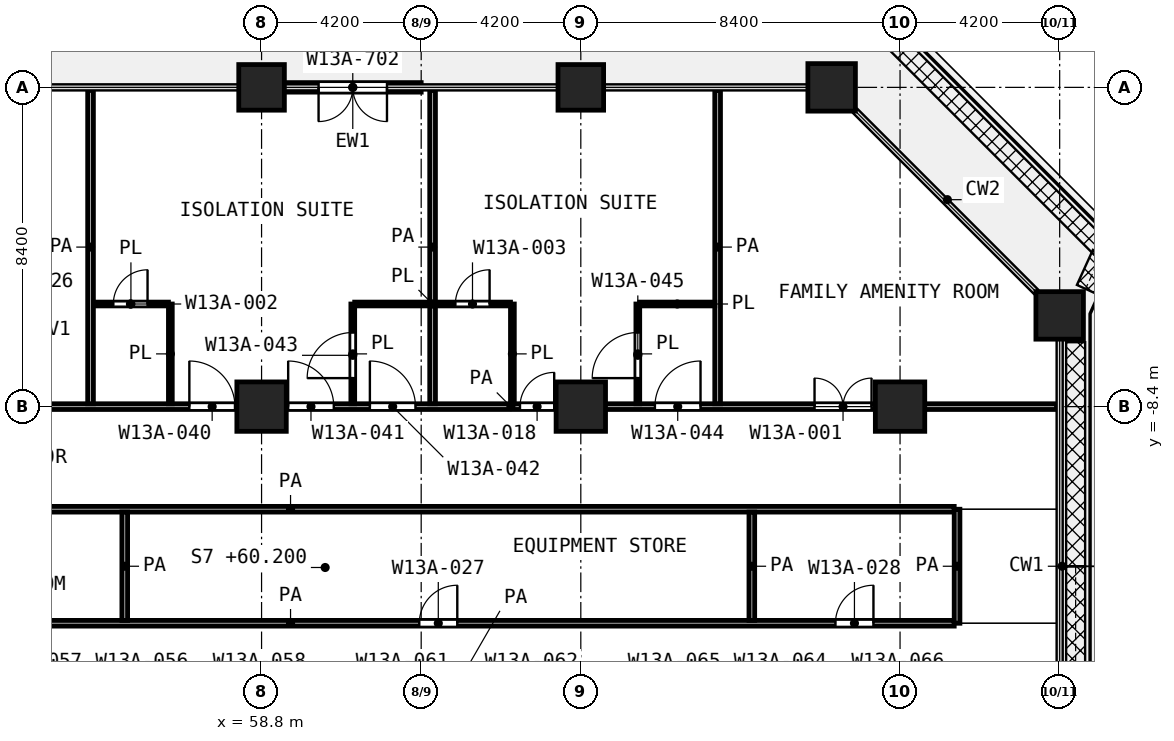
"""IFC4 building model, lengths in metres.
Left out: names, types, materials, properties, quantities, classifications, styles, units other than length and angle.
Written with IfcOpenShell. Run it as: python <this file> out.ifc"""

import sys

from ifc_helpers import new_model, si_unit, direction, frame, frame_2d, origin, origin_2d, place, context, subcontext, project, spatial, rectangle, extrude, element, fill, save


model = new_model("IFC4")
c1 = context("Model", 3, precision=1e-05, world=origin(), true_north=direction((0.0, 1.0)))
c2 = subcontext(c1, "Body", "Model", "MODEL_VIEW")
j1 = project(units=[si_unit("LENGTHUNIT", "METRE"), si_unit("PLANEANGLEUNIT", "RADIAN")], contexts=[c1])
p1 = place(None, origin())
s1 = spatial("IfcSite", under=j1, at=p1, CompositionType="ELEMENT")
p2 = place(p1, origin())
s2 = spatial("IfcBuilding", under=s1, at=p2, CompositionType="ELEMENT")
p3 = place(p2, frame((0.0, 0.0, 60.2)))
s3 = spatial("IfcBuildingStorey", under=s2, at=p3, CompositionType="ELEMENT", Elevation=60.2)
for number, where, z_axis, x_axis in (
    (1, (58.8, 0.0, 0.0), (0.0, 0.0, 1.0), (1.0, 0.0, 0.0)),
    (2, (67.2, 0.0, 0.0), (0.0, 0.0, 1.0), (1.0, 0.0, 0.0)),
):
    element("IfcColumn", number, at=place(p3, frame(where, z_axis=z_axis, x_axis=x_axis)), inside=s3, PredefinedType="COLUMN", context=c2, shape_type="SweptSolid", body=[
        extrude(rectangle(XDim=1.2, YDim=1.2, at=origin_2d()), origin(), (0.0, 0.0, 1.0), 4.2),
    ])
for number, where, z_axis, x_axis in (
    (3, (73.8, 0.0, 0.0), (0.0, 0.0, 1.0), (1.0, 0.0, 0.0)),
    (4, (79.8, -6.0, 0.0), (0.0, 0.0, 1.0), (1.0, 0.0, 0.0)),
):
    element("IfcColumn", number, at=place(p3, frame(where, z_axis=z_axis, x_axis=x_axis)), inside=s3, PredefinedType="COLUMN", context=c2, shape_type="SweptSolid", body=[
        extrude(rectangle(XDim=1.25, YDim=1.25, at=origin_2d()), origin(), (0.0, 0.0, 1.0), 4.2),
    ])
for number, where, z_axis, x_axis in (
    (5, (58.8, -8.4, 0.0), (0.0, 0.0, 1.0), (1.0, 0.0, 0.0)),
    (6, (67.2, -8.4, 0.0), (0.0, 0.0, 1.0), (1.0, 0.0, 0.0)),
    (7, (75.6, -8.4, 0.0), (0.0, 0.0, 1.0), (1.0, 0.0, 0.0)),
):
    element("IfcColumn", number, at=place(p3, frame(where, z_axis=z_axis, x_axis=x_axis)), inside=s3, PredefinedType="COLUMN", context=c2, shape_type="SweptSolid", body=[
        extrude(rectangle(XDim=1.3, YDim=1.3, at=origin_2d()), origin(), (0.0, 0.0, 1.0), 4.2),
    ])
p4 = place(p3, frame((63.0, 0.0, 0.0), z_axis=(0.0, 0.0, 1.0), x_axis=(-1.0, 0.0, 0.0)))
e8 = element("IfcWall", 8, at=p4, inside=s3, PredefinedType="SOLIDWALL", context=c2, shape_type="SweptSolid", body=[
    extrude(rectangle(XDim=3.6, YDim=0.25, at=frame_2d((1.8, 0.0))), origin(), (0.0, 0.0, 1.0), 3.78),
])
p5 = place(p4, frame((0.9, 0.0, 0.0)))
e9 = element("IfcOpeningElement", 9, at=p5, cuts=e8, PredefinedType="OPENING", context=c2, shape_type="SweptSolid", body=[
    extrude(rectangle(XDim=1.8, YDim=2.1, at=frame_2d((0.9, 1.05))), frame((0.0, 0.135, 0.0), z_axis=(0.0, -1.0, 0.0), x_axis=(1.0, 0.0, 0.0)), (0.0, 0.0, 1.0), 0.27),
])
p6 = place(p3, frame((54.375, -5.7, 0.0), z_axis=(0.0, 0.0, 1.0), x_axis=(1.0, 0.0, 0.0)))
e10 = element("IfcWall", 10, at=p6, inside=s3, PredefinedType="PARTITIONING", context=c2, shape_type="SweptSolid", body=[
    extrude(rectangle(XDim=1.975, YDim=0.1, at=frame_2d((0.988, 0.0))), origin(), (0.0, 0.0, 1.0), 3.9),
])
p7 = place(p6, frame((0.525, 0.0, 0.0)))
e11 = element("IfcOpeningElement", 11, at=p7, cuts=e10, PredefinedType="OPENING", context=c2, shape_type="SweptSolid", body=[
    extrude(rectangle(XDim=0.9, YDim=2.1, at=frame_2d((0.45, 1.05))), frame((0.0, 0.06, 0.0), z_axis=(0.0, -1.0, 0.0), x_axis=(1.0, 0.0, 0.0)), (0.0, 0.0, 1.0), 0.12),
])
p8 = place(p3, frame((61.25, -5.7, 0.0), z_axis=(0.0, 0.0, 1.0), x_axis=(1.0, 0.0, 0.0)))
e12 = element("IfcWall", 12, at=p8, inside=s3, PredefinedType="PARTITIONING", context=c2, shape_type="SweptSolid", body=[
    extrude(rectangle(XDim=4.1, YDim=0.1, at=frame_2d((2.05, 0.0))), origin(), (0.0, 0.0, 1.0), 3.9),
])
p9 = place(p8, frame((2.65, 0.0, 0.0)))
e13 = element("IfcOpeningElement", 13, at=p9, cuts=e12, PredefinedType="OPENING", context=c2, shape_type="SweptSolid", body=[
    extrude(rectangle(XDim=0.9, YDim=2.1, at=frame_2d((0.45, 1.05))), frame((0.0, 0.06, 0.0), z_axis=(0.0, -1.0, 0.0), x_axis=(1.0, 0.0, 0.0)), (0.0, 0.0, 1.0), 0.12),
])
p10 = place(p3, frame((68.75, -5.7, 0.0), z_axis=(0.0, 0.0, 1.0), x_axis=(1.0, 0.0, 0.0)))
e14 = element("IfcWall", 14, at=p10, inside=s3, PredefinedType="PARTITIONING", context=c2, shape_type="SweptSolid", body=[
    extrude(rectangle(XDim=1.975, YDim=0.1, at=frame_2d((0.988, 0.0))), origin(), (0.0, 0.0, 1.0), 3.9),
])
p11 = place(p3, frame((56.4, -8.325, 0.0), z_axis=(0.0, 0.0, 1.0), x_axis=(0.0, 1.0, 0.0)))
e15 = element("IfcWall", 15, at=p11, inside=s3, PredefinedType="PARTITIONING", context=c2, shape_type="SweptSolid", body=[
    extrude(rectangle(XDim=2.625, YDim=0.1, at=frame_2d((1.312, 0.0))), origin(), (0.0, 0.0, 1.0), 3.9),
])
p12 = place(p3, frame((61.2, -8.325, 0.0), z_axis=(0.0, 0.0, 1.0), x_axis=(0.0, 1.0, 0.0)))
e16 = element("IfcWall", 16, at=p12, inside=s3, PredefinedType="PARTITIONING", context=c2, shape_type="SweptSolid", body=[
    extrude(rectangle(XDim=2.625, YDim=0.1, at=frame_2d((1.312, 0.0))), origin(), (0.0, 0.0, 1.0), 3.9),
])
p13 = place(p12, frame((0.675, 0.0, 0.0)))
e17 = element("IfcOpeningElement", 17, at=p13, cuts=e16, PredefinedType="OPENING", context=c2, shape_type="SweptSolid", body=[
    extrude(rectangle(XDim=1.2, YDim=2.1, at=frame_2d((0.6, 1.05))), frame((0.0, 0.06, 0.0), z_axis=(0.0, -1.0, 0.0), x_axis=(1.0, 0.0, 0.0)), (0.0, 0.0, 1.0), 0.12),
])
p14 = place(p3, frame((65.4, -8.325, 0.0), z_axis=(0.0, 0.0, 1.0), x_axis=(0.0, 1.0, 0.0)))
e18 = element("IfcWall", 18, at=p14, inside=s3, PredefinedType="PARTITIONING", context=c2, shape_type="SweptSolid", body=[
    extrude(rectangle(XDim=2.625, YDim=0.1, at=frame_2d((1.312, 0.0))), origin(), (0.0, 0.0, 1.0), 3.9),
])
p15 = place(p3, frame((68.7, -8.325, 0.0), z_axis=(0.0, 0.0, 1.0), x_axis=(0.0, 1.0, 0.0)))
e19 = element("IfcWall", 19, at=p15, inside=s3, PredefinedType="PARTITIONING", context=c2, shape_type="SweptSolid", body=[
    extrude(rectangle(XDim=2.625, YDim=0.1, at=frame_2d((1.312, 0.0))), origin(), (0.0, 0.0, 1.0), 3.9),
])
p16 = place(p15, frame((0.675, 0.0, 0.0)))
e20 = element("IfcOpeningElement", 20, at=p16, cuts=e19, PredefinedType="OPENING", context=c2, shape_type="SweptSolid", body=[
    extrude(rectangle(XDim=1.2, YDim=2.1, at=frame_2d((0.6, 1.05))), frame((0.0, 0.06, 0.0), z_axis=(0.0, -1.0, 0.0), x_axis=(1.0, 0.0, 0.0)), (0.0, 0.0, 1.0), 0.12),
])
p17 = place(p3, frame((42.1, -14.1, 0.0), z_axis=(0.0, 0.0, 1.0), x_axis=(1.0, 0.0, 0.0)))
e21 = element("IfcWall", 21, at=p17, inside=s3, PredefinedType="PARTITIONING", context=c2, shape_type="SweptSolid", body=[
    extrude(rectangle(XDim=34.925, YDim=0.15, at=frame_2d((17.462, 0.0))), origin(), (0.0, 0.0, 1.0), 3.9),
])
p18 = place(p17, frame((20.85, 0.0, 0.0)))
e22 = element("IfcOpeningElement", 22, at=p18, cuts=e21, PredefinedType="OPENING", context=c2, shape_type="SweptSolid", body=[
    extrude(rectangle(XDim=1.0, YDim=2.1, at=frame_2d((0.5, 1.05))), frame((0.0, 0.085, 0.0), z_axis=(0.0, -1.0, 0.0), x_axis=(1.0, 0.0, 0.0)), (0.0, 0.0, 1.0), 0.17),
])
p19 = place(p17, frame((31.8, 0.0, 0.0)))
e23 = element("IfcOpeningElement", 23, at=p19, cuts=e21, PredefinedType="OPENING", context=c2, shape_type="SweptSolid", body=[
    extrude(rectangle(XDim=1.0, YDim=2.1, at=frame_2d((0.5, 1.05))), frame((0.0, 0.085, 0.0), z_axis=(0.0, -1.0, 0.0), x_axis=(1.0, 0.0, 0.0)), (0.0, 0.0, 1.0), 0.17),
])
p20 = place(p3, frame((42.1, -11.1, 0.0), z_axis=(0.0, 0.0, 1.0), x_axis=(1.0, 0.0, 0.0)))
e24 = element("IfcWall", 24, at=p20, inside=s3, PredefinedType="PARTITIONING", context=c2, shape_type="SweptSolid", body=[
    extrude(rectangle(XDim=34.925, YDim=0.15, at=frame_2d((17.462, 0.0))), origin(), (0.0, 0.0, 1.0), 3.9),
])
p21 = place(p20, frame((5.9, 0.0, 0.0)))
e25 = element("IfcOpeningElement", 25, at=p21, cuts=e24, PredefinedType="OPENING", context=c2, shape_type="SweptSolid", body=[
    extrude(rectangle(XDim=1.2, YDim=2.1, at=frame_2d((0.6, 1.05))), frame((0.0, 0.085, 0.0), z_axis=(0.0, -1.0, 0.0), x_axis=(1.0, 0.0, 0.0)), (0.0, 0.0, 1.0), 0.17),
])
p22 = place(p3, frame((51.0, -8.4, 0.0), z_axis=(0.0, 0.0, 1.0), x_axis=(1.0, 0.0, 0.0)))
e26 = element("IfcWall", 26, at=p22, inside=s3, PredefinedType="PARTITIONING", context=c2, shape_type="SweptSolid", body=[
    extrude(rectangle(XDim=28.72, YDim=0.15, at=frame_2d((14.36, 0.0))), origin(), (0.0, 0.0, 1.0), 3.9),
])
p23 = place(p22, frame((5.9, 0.0, 0.0)))
e27 = element("IfcOpeningElement", 27, at=p23, cuts=e26, PredefinedType="OPENING", context=c2, shape_type="SweptSolid", body=[
    extrude(rectangle(XDim=1.2, YDim=2.1, at=frame_2d((0.6, 1.05))), frame((0.0, 0.085, 0.0), z_axis=(0.0, -1.0, 0.0), x_axis=(1.0, 0.0, 0.0)), (0.0, 0.0, 1.0), 0.17),
])
p24 = place(p22, frame((8.5, 0.0, 0.0)))
e28 = element("IfcOpeningElement", 28, at=p24, cuts=e26, PredefinedType="OPENING", context=c2, shape_type="SweptSolid", body=[
    extrude(rectangle(XDim=1.2, YDim=2.1, at=frame_2d((0.6, 1.05))), frame((0.0, 0.085, 0.0), z_axis=(0.0, -1.0, 0.0), x_axis=(1.0, 0.0, 0.0)), (0.0, 0.0, 1.0), 0.17),
])
p25 = place(p22, frame((10.65, 0.0, 0.0)))
e29 = element("IfcOpeningElement", 29, at=p25, cuts=e26, PredefinedType="OPENING", context=c2, shape_type="SweptSolid", body=[
    extrude(rectangle(XDim=1.2, YDim=2.1, at=frame_2d((0.6, 1.05))), frame((0.0, 0.085, 0.0), z_axis=(0.0, -1.0, 0.0), x_axis=(1.0, 0.0, 0.0)), (0.0, 0.0, 1.0), 0.17),
])
p26 = place(p22, frame((14.6, 0.0, 0.0)))
e30 = element("IfcOpeningElement", 30, at=p26, cuts=e26, PredefinedType="OPENING", context=c2, shape_type="SweptSolid", body=[
    extrude(rectangle(XDim=0.9, YDim=2.1, at=frame_2d((0.45, 1.05))), frame((0.0, 0.085, 0.0), z_axis=(0.0, -1.0, 0.0), x_axis=(1.0, 0.0, 0.0)), (0.0, 0.0, 1.0), 0.17),
])
p27 = place(p22, frame((18.15, 0.0, 0.0)))
e31 = element("IfcOpeningElement", 31, at=p27, cuts=e26, PredefinedType="OPENING", context=c2, shape_type="SweptSolid", body=[
    extrude(rectangle(XDim=1.2, YDim=2.1, at=frame_2d((0.6, 1.05))), frame((0.0, 0.085, 0.0), z_axis=(0.0, -1.0, 0.0), x_axis=(1.0, 0.0, 0.0)), (0.0, 0.0, 1.0), 0.17),
])
p28 = place(p22, frame((22.35, 0.0, 0.0)))
e32 = element("IfcOpeningElement", 32, at=p28, cuts=e26, PredefinedType="OPENING", context=c2, shape_type="SweptSolid", body=[
    extrude(rectangle(XDim=1.5, YDim=2.1, at=frame_2d((0.75, 1.05))), frame((0.0, 0.085, 0.0), z_axis=(0.0, -1.0, 0.0), x_axis=(1.0, 0.0, 0.0)), (0.0, 0.0, 1.0), 0.17),
])
p29 = place(p3, frame((54.3, -8.325, 0.0), z_axis=(0.0, 0.0, 1.0), x_axis=(0.0, 1.0, 0.0)))
e33 = element("IfcWall", 33, at=p29, inside=s3, PredefinedType="PARTITIONING", context=c2, shape_type="SweptSolid", body=[
    extrude(rectangle(XDim=8.245, YDim=0.15, at=frame_2d((4.123, 0.0))), origin(), (0.0, 0.0, 1.0), 3.9),
])
p30 = place(p3, frame((55.2, -14.025, 0.0), z_axis=(0.0, 0.0, 1.0), x_axis=(0.0, 1.0, 0.0)))
e34 = element("IfcWall", 34, at=p30, inside=s3, PredefinedType="PARTITIONING", context=c2, shape_type="SweptSolid", body=[
    extrude(rectangle(XDim=2.85, YDim=0.15, at=frame_2d((1.425, 0.0))), origin(), (0.0, 0.0, 1.0), 3.9),
])
for number, where, z_axis, x_axis in (
    (35, (63.3, -8.325, 0.0), (0.0, 0.0, 1.0), (0.0, 1.0, 0.0)),
    (36, (70.8, -8.325, 0.0), (0.0, 0.0, 1.0), (0.0, 1.0, 0.0)),
):
    element("IfcWall", number, at=place(p3, frame(where, z_axis=z_axis, x_axis=x_axis)), inside=s3, PredefinedType="PARTITIONING", context=c2, shape_type="SweptSolid", body=[
        extrude(rectangle(XDim=8.245, YDim=0.15, at=frame_2d((4.123, 0.0))), origin(), (0.0, 0.0, 1.0), 3.9),
    ])
p31 = place(p3, frame((71.7, -14.025, 0.0), z_axis=(0.0, 0.0, 1.0), x_axis=(0.0, 1.0, 0.0)))
e37 = element("IfcWall", 37, at=p31, inside=s3, PredefinedType="PARTITIONING", context=c2, shape_type="SweptSolid", body=[
    extrude(rectangle(XDim=2.85, YDim=0.15, at=frame_2d((1.425, 0.0))), origin(), (0.0, 0.0, 1.0), 3.9),
])
p32 = place(p3, frame((77.1, -14.1, 0.0), z_axis=(0.0, 0.0, 1.0), x_axis=(0.0, 1.0, 0.0)))
e38 = element("IfcWall", 38, at=p32, inside=s3, PredefinedType="PARTITIONING", context=c2, shape_type="SweptSolid", body=[
    extrude(rectangle(XDim=3.0, YDim=0.15, at=frame_2d((1.5, 0.0))), origin(), (0.0, 0.0, 1.0), 3.9),
])
p33 = place(p5, origin())
e39 = element("IfcDoor", 39, at=p33, inside=s3, OperationType="DOUBLE_DOOR_SINGLE_SWING", PredefinedType="DOOR", context=c2, shape_type="SweptSolid", body=[
    extrude(rectangle(XDim=1.8, YDim=2.1, at=frame_2d((0.9, 1.05))), frame((0.0, 0.025, 0.0), z_axis=(0.0, -1.0, 0.0), x_axis=(1.0, 0.0, 0.0)), (0.0, 0.0, 1.0), 0.05),
])
fill(e9, e39)
p34 = place(p23, origin())
e40 = element("IfcDoor", 40, at=p34, inside=s3, OperationType="SINGLE_SWING_LEFT", PredefinedType="DOOR", context=c2, shape_type="SweptSolid", body=[
    extrude(rectangle(XDim=1.2, YDim=2.1, at=frame_2d((0.6, 1.05))), frame((0.0, 0.025, 0.0), z_axis=(0.0, -1.0, 0.0), x_axis=(1.0, 0.0, 0.0)), (0.0, 0.0, 1.0), 0.05),
])
fill(e27, e40)
p35 = place(p24, origin())
e41 = element("IfcDoor", 41, at=p35, inside=s3, OperationType="SINGLE_SWING_LEFT", PredefinedType="DOOR", context=c2, shape_type="SweptSolid", body=[
    extrude(rectangle(XDim=1.2, YDim=2.1, at=frame_2d((0.6, 1.05))), frame((0.0, 0.025, 0.0), z_axis=(0.0, -1.0, 0.0), x_axis=(1.0, 0.0, 0.0)), (0.0, 0.0, 1.0), 0.05),
])
fill(e28, e41)
p36 = place(p25, origin())
e42 = element("IfcDoor", 42, at=p36, inside=s3, OperationType="SINGLE_SWING_LEFT", PredefinedType="DOOR", context=c2, shape_type="SweptSolid", body=[
    extrude(rectangle(XDim=1.2, YDim=2.1, at=frame_2d((0.6, 1.05))), frame((0.0, 0.025, 0.0), z_axis=(0.0, -1.0, 0.0), x_axis=(1.0, 0.0, 0.0)), (0.0, 0.0, 1.0), 0.05),
])
fill(e29, e42)
p37 = place(p13, origin())
e43 = element("IfcDoor", 43, at=p37, inside=s3, OperationType="SINGLE_SWING_LEFT", PredefinedType="DOOR", context=c2, shape_type="SweptSolid", body=[
    extrude(rectangle(XDim=1.2, YDim=2.1, at=frame_2d((0.6, 1.05))), frame((0.0, 0.025, 0.0), z_axis=(0.0, -1.0, 0.0), x_axis=(1.0, 0.0, 0.0)), (0.0, 0.0, 1.0), 0.05),
])
fill(e17, e43)
p38 = place(p7, origin())
e44 = element("IfcDoor", 44, at=p38, inside=s3, OperationType="SINGLE_SWING_RIGHT", PredefinedType="DOOR", context=c2, shape_type="SweptSolid", body=[
    extrude(rectangle(XDim=0.9, YDim=2.1, at=frame_2d((0.45, 1.05))), frame((0.0, 0.025, 0.0), z_axis=(0.0, -1.0, 0.0), x_axis=(1.0, 0.0, 0.0)), (0.0, 0.0, 1.0), 0.05),
])
fill(e11, e44)
p39 = place(p26, origin())
e45 = element("IfcDoor", 45, at=p39, inside=s3, OperationType="SINGLE_SWING_RIGHT", PredefinedType="DOOR", context=c2, shape_type="SweptSolid", body=[
    extrude(rectangle(XDim=0.9, YDim=2.1, at=frame_2d((0.45, 1.05))), frame((0.0, 0.025, 0.0), z_axis=(0.0, -1.0, 0.0), x_axis=(1.0, 0.0, 0.0)), (0.0, 0.0, 1.0), 0.05),
])
fill(e30, e45)
p40 = place(p27, origin())
e46 = element("IfcDoor", 46, at=p40, inside=s3, OperationType="SINGLE_SWING_RIGHT", PredefinedType="DOOR", context=c2, shape_type="SweptSolid", body=[
    extrude(rectangle(XDim=1.2, YDim=2.1, at=frame_2d((0.6, 1.05))), frame((0.0, 0.025, 0.0), z_axis=(0.0, -1.0, 0.0), x_axis=(1.0, 0.0, 0.0)), (0.0, 0.0, 1.0), 0.05),
])
fill(e31, e46)
p41 = place(p16, origin())
e47 = element("IfcDoor", 47, at=p41, inside=s3, OperationType="SINGLE_SWING_LEFT", PredefinedType="DOOR", context=c2, shape_type="SweptSolid", body=[
    extrude(rectangle(XDim=1.2, YDim=2.1, at=frame_2d((0.6, 1.05))), frame((0.0, 0.025, 0.0), z_axis=(0.0, -1.0, 0.0), x_axis=(1.0, 0.0, 0.0)), (0.0, 0.0, 1.0), 0.05),
])
fill(e20, e47)
p42 = place(p9, origin())
e48 = element("IfcDoor", 48, at=p42, inside=s3, OperationType="SINGLE_SWING_RIGHT", PredefinedType="DOOR", context=c2, shape_type="SweptSolid", body=[
    extrude(rectangle(XDim=0.9, YDim=2.1, at=frame_2d((0.45, 1.05))), frame((0.0, 0.025, 0.0), z_axis=(0.0, -1.0, 0.0), x_axis=(1.0, 0.0, 0.0)), (0.0, 0.0, 1.0), 0.05),
])
fill(e13, e48)
p43 = place(p28, origin())
e49 = element("IfcDoor", 49, at=p43, inside=s3, OperationType="DOUBLE_DOOR_SINGLE_SWING", PredefinedType="DOOR", context=c2, shape_type="SweptSolid", body=[
    extrude(rectangle(XDim=1.5, YDim=2.1, at=frame_2d((0.75, 1.05))), frame((0.0, 0.025, 0.0), z_axis=(0.0, -1.0, 0.0), x_axis=(1.0, 0.0, 0.0)), (0.0, 0.0, 1.0), 0.05),
])
fill(e32, e49)
p44 = place(p18, origin())
e50 = element("IfcDoor", 50, at=p44, inside=s3, OperationType="SINGLE_SWING_RIGHT", PredefinedType="DOOR", context=c2, shape_type="SweptSolid", body=[
    extrude(rectangle(XDim=1.0, YDim=2.1, at=frame_2d((0.5, 1.05))), frame((0.0, 0.025, 0.0), z_axis=(0.0, -1.0, 0.0), x_axis=(1.0, 0.0, 0.0)), (0.0, 0.0, 1.0), 0.05),
])
fill(e22, e50)
p45 = place(p19, origin())
e51 = element("IfcDoor", 51, at=p45, inside=s3, OperationType="SINGLE_SWING_RIGHT", PredefinedType="DOOR", context=c2, shape_type="SweptSolid", body=[
    extrude(rectangle(XDim=1.0, YDim=2.1, at=frame_2d((0.5, 1.05))), frame((0.0, 0.025, 0.0), z_axis=(0.0, -1.0, 0.0), x_axis=(1.0, 0.0, 0.0)), (0.0, 0.0, 1.0), 0.05),
])
fill(e23, e51)
save(model, sys.argv[1])
